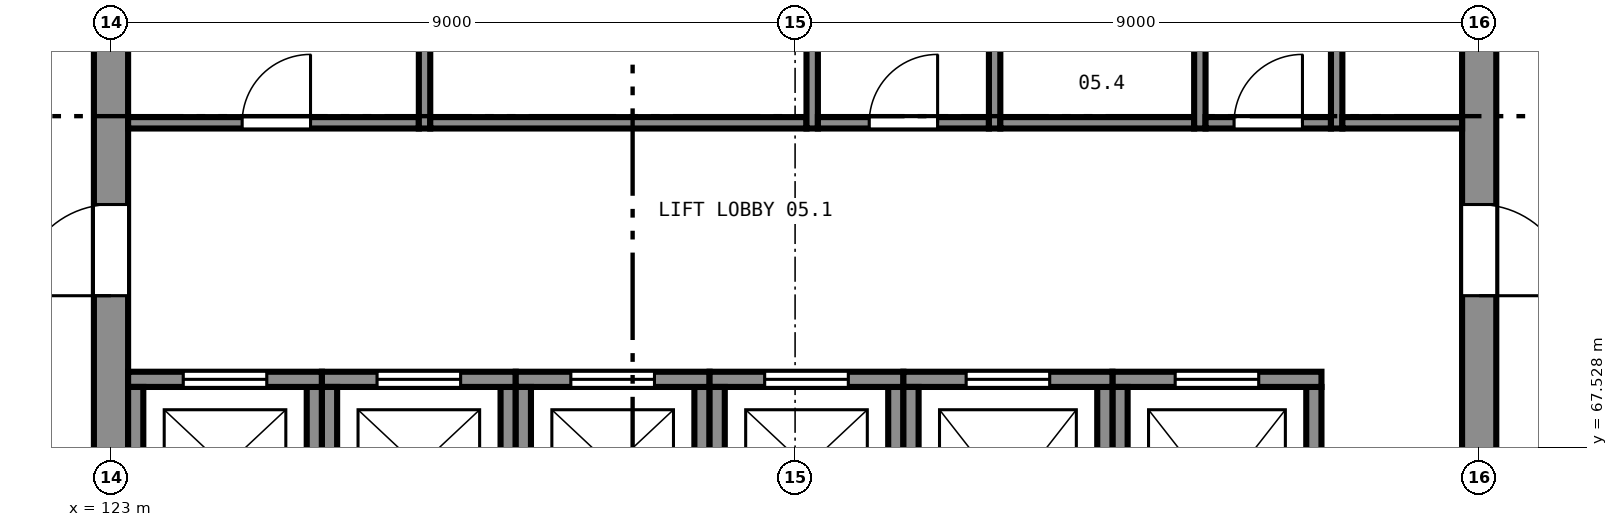
"""IFC4 building model, lengths in metres.
Left out: names, types, materials, properties, quantities, classifications, styles, units other than length and angle.
Written with IfcOpenShell. Run it as: python <this file> out.ifc"""

import sys

from ifc_helpers import new_model, si_unit, direction, frame, frame_2d, origin, place, context, subcontext, project, spatial, rectangle, extrude, element, fill, save


model = new_model("IFC4")
c1 = context("Model", 3, precision=1e-05, world=origin(), true_north=direction((0.0, 1.0)))
c2 = subcontext(c1, "Body", "Model", "MODEL_VIEW")
j1 = project(units=[si_unit("LENGTHUNIT", "METRE"), si_unit("PLANEANGLEUNIT", "RADIAN")], contexts=[c1])
p1 = place(None, origin())
s1 = spatial("IfcSite", under=j1, at=p1, CompositionType="ELEMENT")
p2 = place(p1, origin())
s2 = spatial("IfcBuilding", under=s1, at=p2, CompositionType="ELEMENT")
p3 = place(p2, frame((0.0, 0.0, 21.5)))
s3 = spatial("IfcBuildingStorey", under=s2, at=p3, CompositionType="ELEMENT", Elevation=21.5)
p4 = place(p3, frame((141.0, 65.225, 0.0), z_axis=(0.0, 0.0, 1.0), x_axis=(0.0, 1.0, 0.0)))
e1 = element("IfcWall", 1, at=p4, inside=s3, PredefinedType="SHEAR", context=c2, shape_type="SweptSolid", body=[
    extrude(rectangle(XDim=17.55, YDim=0.45, at=frame_2d((8.775, 0.0))), origin(), (0.0, 0.0, 1.0), 4.0),
])
p5 = place(p4, frame((4.3, 0.0, 0.0)))
e2 = element("IfcOpeningElement", 2, at=p5, cuts=e1, PredefinedType="OPENING", context=c2, shape_type="SweptSolid", body=[
    extrude(rectangle(XDim=1.2, YDim=2.1, at=frame_2d((0.6, 1.05))), frame((0.0, 0.235, 0.0), z_axis=(0.0, -1.0, 0.0), x_axis=(1.0, 0.0, 0.0)), (0.0, 0.0, 1.0), 0.47),
])
p6 = place(p4, frame((12.05, 0.0, 0.0)))
e3 = element("IfcOpeningElement", 3, at=p6, cuts=e1, PredefinedType="OPENING", context=c2, shape_type="SweptSolid", body=[
    extrude(rectangle(XDim=1.2, YDim=2.1, at=frame_2d((0.6, 1.05))), frame((0.0, 0.235, 0.0), z_axis=(0.0, -1.0, 0.0), x_axis=(1.0, 0.0, 0.0)), (0.0, 0.0, 1.0), 0.47),
])
p7 = place(p3, frame((123.0, 82.775, 0.0), z_axis=(0.0, 0.0, 1.0), x_axis=(0.0, -1.0, 0.0)))
e4 = element("IfcWall", 4, at=p7, inside=s3, PredefinedType="SHEAR", context=c2, shape_type="SweptSolid", body=[
    extrude(rectangle(XDim=17.55, YDim=0.45, at=frame_2d((8.775, 0.0))), origin(), (0.0, 0.0, 1.0), 4.0),
])
p8 = place(p7, frame((12.05, 0.0, 0.0)))
e5 = element("IfcOpeningElement", 5, at=p8, cuts=e4, PredefinedType="OPENING", context=c2, shape_type="SweptSolid", body=[
    extrude(rectangle(XDim=1.2, YDim=2.1, at=frame_2d((0.6, 1.05))), frame((0.0, 0.235, 0.0), z_axis=(0.0, -1.0, 0.0), x_axis=(1.0, 0.0, 0.0)), (0.0, 0.0, 1.0), 0.47),
])
p9 = place(p7, frame((4.3, 0.0, 0.0)))
e6 = element("IfcOpeningElement", 6, at=p9, cuts=e4, PredefinedType="OPENING", context=c2, shape_type="SweptSolid", body=[
    extrude(rectangle(XDim=1.2, YDim=2.1, at=frame_2d((0.6, 1.05))), frame((0.0, 0.235, 0.0), z_axis=(0.0, -1.0, 0.0), x_axis=(1.0, 0.0, 0.0)), (0.0, 0.0, 1.0), 0.47),
])
p10 = place(p3, frame((125.675, 66.225, 0.0), z_axis=(0.0, 0.0, 1.0), x_axis=(0.0, 1.0, 0.0)))
e7 = element("IfcWall", 7, at=p10, inside=s3, PredefinedType="SHEAR", context=c2, shape_type="SweptSolid", body=[
    extrude(rectangle(XDim=2.1, YDim=0.2, at=frame_2d((1.05, 0.0))), origin(), (0.0, 0.0, 1.0), 4.0),
])
p11 = place(p3, frame((125.775, 68.425, 0.0), z_axis=(0.0, 0.0, 1.0), x_axis=(-1.0, 0.0, 0.0)))
e8 = element("IfcWall", 8, at=p11, inside=s3, PredefinedType="SHEAR", context=c2, shape_type="SweptSolid", body=[
    extrude(rectangle(XDim=2.55, YDim=0.2, at=frame_2d((1.275, 0.0))), origin(), (0.0, 0.0, 1.0), 4.0),
])
p12 = place(p11, frame((0.725, 0.0, 0.0)))
e9 = element("IfcOpeningElement", 9, at=p12, cuts=e8, PredefinedType="OPENING", context=c2, shape_type="SweptSolid", body=[
    extrude(rectangle(XDim=1.1, YDim=2.1, at=frame_2d((0.55, 1.05))), frame((0.0, 0.11, 0.0), z_axis=(0.0, -1.0, 0.0), x_axis=(1.0, 0.0, 0.0)), (0.0, 0.0, 1.0), 0.22),
])
for number, where, z_axis, x_axis in (
    (10, (123.325, 68.325, 0.0), (0.0, 0.0, 1.0), (0.0, -1.0, 0.0)),
    (11, (128.225, 66.225, 0.0), (0.0, 0.0, 1.0), (0.0, 1.0, 0.0)),
):
    element("IfcWall", number, at=place(p3, frame(where, z_axis=z_axis, x_axis=x_axis)), inside=s3, PredefinedType="SHEAR", context=c2, shape_type="SweptSolid", body=[
        extrude(rectangle(XDim=2.1, YDim=0.2, at=frame_2d((1.05, 0.0))), origin(), (0.0, 0.0, 1.0), 4.0),
    ])
p13 = place(p3, frame((128.325, 68.425, 0.0), z_axis=(0.0, 0.0, 1.0), x_axis=(-1.0, 0.0, 0.0)))
e12 = element("IfcWall", 12, at=p13, inside=s3, PredefinedType="SHEAR", context=c2, shape_type="SweptSolid", body=[
    extrude(rectangle(XDim=2.55, YDim=0.2, at=frame_2d((1.275, 0.0))), origin(), (0.0, 0.0, 1.0), 4.0),
])
p14 = place(p13, frame((0.725, 0.0, 0.0)))
e13 = element("IfcOpeningElement", 13, at=p14, cuts=e12, PredefinedType="OPENING", context=c2, shape_type="SweptSolid", body=[
    extrude(rectangle(XDim=1.1, YDim=2.1, at=frame_2d((0.55, 1.05))), frame((0.0, 0.11, 0.0), z_axis=(0.0, -1.0, 0.0), x_axis=(1.0, 0.0, 0.0)), (0.0, 0.0, 1.0), 0.22),
])
for number, where, z_axis, x_axis in (
    (14, (125.875, 68.325, 0.0), (0.0, 0.0, 1.0), (0.0, -1.0, 0.0)),
    (15, (130.775, 66.225, 0.0), (0.0, 0.0, 1.0), (0.0, 1.0, 0.0)),
):
    element("IfcWall", number, at=place(p3, frame(where, z_axis=z_axis, x_axis=x_axis)), inside=s3, PredefinedType="SHEAR", context=c2, shape_type="SweptSolid", body=[
        extrude(rectangle(XDim=2.1, YDim=0.2, at=frame_2d((1.05, 0.0))), origin(), (0.0, 0.0, 1.0), 4.0),
    ])
p15 = place(p3, frame((130.875, 68.425, 0.0), z_axis=(0.0, 0.0, 1.0), x_axis=(-1.0, 0.0, 0.0)))
e16 = element("IfcWall", 16, at=p15, inside=s3, PredefinedType="SHEAR", context=c2, shape_type="SweptSolid", body=[
    extrude(rectangle(XDim=2.55, YDim=0.2, at=frame_2d((1.275, 0.0))), origin(), (0.0, 0.0, 1.0), 4.0),
])
p16 = place(p15, frame((0.725, 0.0, 0.0)))
e17 = element("IfcOpeningElement", 17, at=p16, cuts=e16, PredefinedType="OPENING", context=c2, shape_type="SweptSolid", body=[
    extrude(rectangle(XDim=1.1, YDim=2.1, at=frame_2d((0.55, 1.05))), frame((0.0, 0.11, 0.0), z_axis=(0.0, -1.0, 0.0), x_axis=(1.0, 0.0, 0.0)), (0.0, 0.0, 1.0), 0.22),
])
for number, where, z_axis, x_axis in (
    (18, (128.425, 68.325, 0.0), (0.0, 0.0, 1.0), (0.0, -1.0, 0.0)),
    (19, (133.325, 66.225, 0.0), (0.0, 0.0, 1.0), (0.0, 1.0, 0.0)),
):
    element("IfcWall", number, at=place(p3, frame(where, z_axis=z_axis, x_axis=x_axis)), inside=s3, PredefinedType="SHEAR", context=c2, shape_type="SweptSolid", body=[
        extrude(rectangle(XDim=2.1, YDim=0.2, at=frame_2d((1.05, 0.0))), origin(), (0.0, 0.0, 1.0), 4.0),
    ])
p17 = place(p3, frame((133.425, 68.425, 0.0), z_axis=(0.0, 0.0, 1.0), x_axis=(-1.0, 0.0, 0.0)))
e20 = element("IfcWall", 20, at=p17, inside=s3, PredefinedType="SHEAR", context=c2, shape_type="SweptSolid", body=[
    extrude(rectangle(XDim=2.55, YDim=0.2, at=frame_2d((1.275, 0.0))), origin(), (0.0, 0.0, 1.0), 4.0),
])
p18 = place(p17, frame((0.725, 0.0, 0.0)))
e21 = element("IfcOpeningElement", 21, at=p18, cuts=e20, PredefinedType="OPENING", context=c2, shape_type="SweptSolid", body=[
    extrude(rectangle(XDim=1.1, YDim=2.1, at=frame_2d((0.55, 1.05))), frame((0.0, 0.11, 0.0), z_axis=(0.0, -1.0, 0.0), x_axis=(1.0, 0.0, 0.0)), (0.0, 0.0, 1.0), 0.22),
])
p19 = place(p3, frame((130.975, 68.325, 0.0), z_axis=(0.0, 0.0, 1.0), x_axis=(0.0, -1.0, 0.0)))
e22 = element("IfcWall", 22, at=p19, inside=s3, PredefinedType="SHEAR", context=c2, shape_type="SweptSolid", body=[
    extrude(rectangle(XDim=2.1, YDim=0.2, at=frame_2d((1.05, 0.0))), origin(), (0.0, 0.0, 1.0), 4.0),
])
p20 = place(p3, frame((136.075, 65.425, 0.0), z_axis=(0.0, 0.0, 1.0), x_axis=(0.0, 1.0, 0.0)))
e23 = element("IfcWall", 23, at=p20, inside=s3, PredefinedType="SHEAR", context=c2, shape_type="SweptSolid", body=[
    extrude(rectangle(XDim=2.9, YDim=0.2, at=frame_2d((1.45, 0.0))), origin(), (0.0, 0.0, 1.0), 4.0),
])
p21 = place(p3, frame((136.175, 68.425, 0.0), z_axis=(0.0, 0.0, 1.0), x_axis=(-1.0, 0.0, 0.0)))
e24 = element("IfcWall", 24, at=p21, inside=s3, PredefinedType="SHEAR", context=c2, shape_type="SweptSolid", body=[
    extrude(rectangle(XDim=2.75, YDim=0.2, at=frame_2d((1.375, 0.0))), origin(), (0.0, 0.0, 1.0), 4.0),
])
p22 = place(p21, frame((0.825, 0.0, 0.0)))
e25 = element("IfcOpeningElement", 25, at=p22, cuts=e24, PredefinedType="OPENING", context=c2, shape_type="SweptSolid", body=[
    extrude(rectangle(XDim=1.1, YDim=2.1, at=frame_2d((0.55, 1.05))), frame((0.0, 0.11, 0.0), z_axis=(0.0, -1.0, 0.0), x_axis=(1.0, 0.0, 0.0)), (0.0, 0.0, 1.0), 0.22),
])
for number, where, z_axis, x_axis in (
    (26, (133.525, 68.325, 0.0), (0.0, 0.0, 1.0), (0.0, -1.0, 0.0)),
    (27, (138.825, 65.425, 0.0), (0.0, 0.0, 1.0), (0.0, 1.0, 0.0)),
):
    element("IfcWall", number, at=place(p3, frame(where, z_axis=z_axis, x_axis=x_axis)), inside=s3, PredefinedType="SHEAR", context=c2, shape_type="SweptSolid", body=[
        extrude(rectangle(XDim=2.9, YDim=0.2, at=frame_2d((1.45, 0.0))), origin(), (0.0, 0.0, 1.0), 4.0),
    ])
p23 = place(p3, frame((138.925, 68.425, 0.0), z_axis=(0.0, 0.0, 1.0), x_axis=(-1.0, 0.0, 0.0)))
e28 = element("IfcWall", 28, at=p23, inside=s3, PredefinedType="SHEAR", context=c2, shape_type="SweptSolid", body=[
    extrude(rectangle(XDim=2.75, YDim=0.2, at=frame_2d((1.375, 0.0))), origin(), (0.0, 0.0, 1.0), 4.0),
])
p24 = place(p23, frame((0.825, 0.0, 0.0)))
e29 = element("IfcOpeningElement", 29, at=p24, cuts=e28, PredefinedType="OPENING", context=c2, shape_type="SweptSolid", body=[
    extrude(rectangle(XDim=1.1, YDim=2.1, at=frame_2d((0.55, 1.05))), frame((0.0, 0.11, 0.0), z_axis=(0.0, -1.0, 0.0), x_axis=(1.0, 0.0, 0.0)), (0.0, 0.0, 1.0), 0.22),
])
p25 = place(p3, frame((136.275, 68.325, 0.0), z_axis=(0.0, 0.0, 1.0), x_axis=(0.0, -1.0, 0.0)))
e30 = element("IfcWall", 30, at=p25, inside=s3, PredefinedType="SHEAR", context=c2, shape_type="SweptSolid", body=[
    extrude(rectangle(XDim=2.9, YDim=0.2, at=frame_2d((1.45, 0.0))), origin(), (0.0, 0.0, 1.0), 4.0),
])
p26 = place(p3, frame((127.125, 71.725, 0.0), z_axis=(0.0, 0.0, 1.0), x_axis=(0.0, 1.0, 0.0)))
e31 = element("IfcWall", 31, at=p26, inside=s3, PredefinedType="PARTITIONING", context=c2, shape_type="SweptSolid", body=[
    extrude(rectangle(XDim=4.55, YDim=0.15, at=frame_2d((2.275, 0.0))), origin(), (0.0, 0.0, 1.0), 3.75),
])
p27 = place(p3, frame((123.225, 71.8, 0.0), z_axis=(0.0, 0.0, 1.0), x_axis=(1.0, 0.0, 0.0)))
e32 = element("IfcWall", 32, at=p27, inside=s3, PredefinedType="PARTITIONING", context=c2, shape_type="SweptSolid", body=[
    extrude(rectangle(XDim=3.825, YDim=0.15, at=frame_2d((1.913, 0.0))), origin(), (0.0, 0.0, 1.0), 3.75),
])
p28 = place(p27, frame((1.5, 0.0, 0.0)))
e33 = element("IfcOpeningElement", 33, at=p28, cuts=e32, PredefinedType="OPENING", context=c2, shape_type="SweptSolid", body=[
    extrude(rectangle(XDim=0.9, YDim=2.1, at=frame_2d((0.45, 1.05))), frame((0.0, 0.085, 0.0), z_axis=(0.0, -1.0, 0.0), x_axis=(1.0, 0.0, 0.0)), (0.0, 0.0, 1.0), 0.17),
])
p29 = place(p3, frame((132.225, 71.725, 0.0), z_axis=(0.0, 0.0, 1.0), x_axis=(0.0, 1.0, 0.0)))
e34 = element("IfcWall", 34, at=p29, inside=s3, PredefinedType="PARTITIONING", context=c2, shape_type="SweptSolid", body=[
    extrude(rectangle(XDim=4.55, YDim=0.15, at=frame_2d((2.275, 0.0))), origin(), (0.0, 0.0, 1.0), 3.75),
])
p30 = place(p3, frame((127.2, 71.8, 0.0), z_axis=(0.0, 0.0, 1.0), x_axis=(1.0, 0.0, 0.0)))
e35 = element("IfcWall", 35, at=p30, inside=s3, PredefinedType="PARTITIONING", context=c2, shape_type="SweptSolid", body=[
    extrude(rectangle(XDim=4.95, YDim=0.15, at=frame_2d((2.475, 0.0))), origin(), (0.0, 0.0, 1.0), 3.75),
])
p31 = place(p3, frame((134.625, 71.725, 0.0), z_axis=(0.0, 0.0, 1.0), x_axis=(0.0, 1.0, 0.0)))
e36 = element("IfcWall", 36, at=p31, inside=s3, PredefinedType="PARTITIONING", context=c2, shape_type="SweptSolid", body=[
    extrude(rectangle(XDim=4.55, YDim=0.15, at=frame_2d((2.275, 0.0))), origin(), (0.0, 0.0, 1.0), 3.75),
])
p32 = place(p3, frame((132.3, 71.8, 0.0), z_axis=(0.0, 0.0, 1.0), x_axis=(1.0, 0.0, 0.0)))
e37 = element("IfcWall", 37, at=p32, inside=s3, PredefinedType="PARTITIONING", context=c2, shape_type="SweptSolid", body=[
    extrude(rectangle(XDim=2.25, YDim=0.15, at=frame_2d((1.125, 0.0))), origin(), (0.0, 0.0, 1.0), 3.75),
])
p33 = place(p32, frame((0.675, 0.0, 0.0)))
e38 = element("IfcOpeningElement", 38, at=p33, cuts=e37, PredefinedType="OPENING", context=c2, shape_type="SweptSolid", body=[
    extrude(rectangle(XDim=0.9, YDim=2.1, at=frame_2d((0.45, 1.05))), frame((0.0, 0.085, 0.0), z_axis=(0.0, -1.0, 0.0), x_axis=(1.0, 0.0, 0.0)), (0.0, 0.0, 1.0), 0.17),
])
p34 = place(p3, frame((137.325, 71.725, 0.0), z_axis=(0.0, 0.0, 1.0), x_axis=(0.0, 1.0, 0.0)))
e39 = element("IfcWall", 39, at=p34, inside=s3, PredefinedType="PARTITIONING", context=c2, shape_type="SweptSolid", body=[
    extrude(rectangle(XDim=4.55, YDim=0.15, at=frame_2d((2.275, 0.0))), origin(), (0.0, 0.0, 1.0), 3.75),
])
p35 = place(p3, frame((134.7, 71.8, 0.0), z_axis=(0.0, 0.0, 1.0), x_axis=(1.0, 0.0, 0.0)))
e40 = element("IfcWall", 40, at=p35, inside=s3, PredefinedType="PARTITIONING", context=c2, shape_type="SweptSolid", body=[
    extrude(rectangle(XDim=2.55, YDim=0.15, at=frame_2d((1.275, 0.0))), origin(), (0.0, 0.0, 1.0), 3.75),
])
p36 = place(p3, frame((139.125, 71.725, 0.0), z_axis=(0.0, 0.0, 1.0), x_axis=(0.0, 1.0, 0.0)))
e41 = element("IfcWall", 41, at=p36, inside=s3, PredefinedType="PARTITIONING", context=c2, shape_type="SweptSolid", body=[
    extrude(rectangle(XDim=4.55, YDim=0.15, at=frame_2d((2.275, 0.0))), origin(), (0.0, 0.0, 1.0), 3.75),
])
p37 = place(p3, frame((137.4, 71.8, 0.0), z_axis=(0.0, 0.0, 1.0), x_axis=(1.0, 0.0, 0.0)))
e42 = element("IfcWall", 42, at=p37, inside=s3, PredefinedType="PARTITIONING", context=c2, shape_type="SweptSolid", body=[
    extrude(rectangle(XDim=1.65, YDim=0.15, at=frame_2d((0.825, 0.0))), origin(), (0.0, 0.0, 1.0), 3.75),
])
p38 = place(p37, frame((0.375, 0.0, 0.0)))
e43 = element("IfcOpeningElement", 43, at=p38, cuts=e42, PredefinedType="OPENING", context=c2, shape_type="SweptSolid", body=[
    extrude(rectangle(XDim=0.9, YDim=2.1, at=frame_2d((0.45, 1.05))), frame((0.0, 0.085, 0.0), z_axis=(0.0, -1.0, 0.0), x_axis=(1.0, 0.0, 0.0)), (0.0, 0.0, 1.0), 0.17),
])
p39 = place(p3, frame((139.2, 71.8, 0.0), z_axis=(0.0, 0.0, 1.0), x_axis=(1.0, 0.0, 0.0)))
e44 = element("IfcWall", 44, at=p39, inside=s3, PredefinedType="PARTITIONING", context=c2, shape_type="SweptSolid", body=[
    extrude(rectangle(XDim=1.575, YDim=0.15, at=frame_2d((0.788, 0.0))), origin(), (0.0, 0.0, 1.0), 3.75),
])
p40 = place(p12, origin())
e45 = element("IfcDoor", 45, at=p40, inside=s3, OperationType="SLIDING_TO_LEFT", PredefinedType="DOOR", context=c2, shape_type="SweptSolid", body=[
    extrude(rectangle(XDim=1.1, YDim=2.1, at=frame_2d((0.55, 1.05))), frame((0.0, 0.025, 0.0), z_axis=(0.0, -1.0, 0.0), x_axis=(1.0, 0.0, 0.0)), (0.0, 0.0, 1.0), 0.05),
])
fill(e9, e45)
p41 = place(p14, origin())
e46 = element("IfcDoor", 46, at=p41, inside=s3, OperationType="SLIDING_TO_LEFT", PredefinedType="DOOR", context=c2, shape_type="SweptSolid", body=[
    extrude(rectangle(XDim=1.1, YDim=2.1, at=frame_2d((0.55, 1.05))), frame((0.0, 0.025, 0.0), z_axis=(0.0, -1.0, 0.0), x_axis=(1.0, 0.0, 0.0)), (0.0, 0.0, 1.0), 0.05),
])
fill(e13, e46)
p42 = place(p16, origin())
e47 = element("IfcDoor", 47, at=p42, inside=s3, OperationType="SLIDING_TO_LEFT", PredefinedType="DOOR", context=c2, shape_type="SweptSolid", body=[
    extrude(rectangle(XDim=1.1, YDim=2.1, at=frame_2d((0.55, 1.05))), frame((0.0, 0.025, 0.0), z_axis=(0.0, -1.0, 0.0), x_axis=(1.0, 0.0, 0.0)), (0.0, 0.0, 1.0), 0.05),
])
fill(e17, e47)
p43 = place(p18, origin())
e48 = element("IfcDoor", 48, at=p43, inside=s3, OperationType="SLIDING_TO_LEFT", PredefinedType="DOOR", context=c2, shape_type="SweptSolid", body=[
    extrude(rectangle(XDim=1.1, YDim=2.1, at=frame_2d((0.55, 1.05))), frame((0.0, 0.025, 0.0), z_axis=(0.0, -1.0, 0.0), x_axis=(1.0, 0.0, 0.0)), (0.0, 0.0, 1.0), 0.05),
])
fill(e21, e48)
p44 = place(p22, origin())
e49 = element("IfcDoor", 49, at=p44, inside=s3, OperationType="SLIDING_TO_LEFT", PredefinedType="DOOR", context=c2, shape_type="SweptSolid", body=[
    extrude(rectangle(XDim=1.1, YDim=2.1, at=frame_2d((0.55, 1.05))), frame((0.0, 0.025, 0.0), z_axis=(0.0, -1.0, 0.0), x_axis=(1.0, 0.0, 0.0)), (0.0, 0.0, 1.0), 0.05),
])
fill(e25, e49)
p45 = place(p24, origin())
e50 = element("IfcDoor", 50, at=p45, inside=s3, OperationType="SLIDING_TO_LEFT", PredefinedType="DOOR", context=c2, shape_type="SweptSolid", body=[
    extrude(rectangle(XDim=1.1, YDim=2.1, at=frame_2d((0.55, 1.05))), frame((0.0, 0.025, 0.0), z_axis=(0.0, -1.0, 0.0), x_axis=(1.0, 0.0, 0.0)), (0.0, 0.0, 1.0), 0.05),
])
fill(e29, e50)
p46 = place(p8, frame((1.2, 0.0, 0.0), z_axis=(0.0, 0.0, 1.0), x_axis=(-1.0, 0.0, 0.0)))
e51 = element("IfcDoor", 51, at=p46, inside=s3, OperationType="SINGLE_SWING_RIGHT", PredefinedType="DOOR", context=c2, shape_type="SweptSolid", body=[
    extrude(rectangle(XDim=1.2, YDim=2.1, at=frame_2d((0.6, 1.05))), frame((0.0, 0.025, 0.0), z_axis=(0.0, -1.0, 0.0), x_axis=(1.0, 0.0, 0.0)), (0.0, 0.0, 1.0), 0.05),
])
fill(e5, e51)
p47 = place(p5, frame((1.2, 0.0, 0.0), z_axis=(0.0, 0.0, 1.0), x_axis=(-1.0, 0.0, 0.0)))
e52 = element("IfcDoor", 52, at=p47, inside=s3, OperationType="SINGLE_SWING_LEFT", PredefinedType="DOOR", context=c2, shape_type="SweptSolid", body=[
    extrude(rectangle(XDim=1.2, YDim=2.1, at=frame_2d((0.6, 1.05))), frame((0.0, 0.025, 0.0), z_axis=(0.0, -1.0, 0.0), x_axis=(1.0, 0.0, 0.0)), (0.0, 0.0, 1.0), 0.05),
])
fill(e2, e52)
p48 = place(p28, origin())
e53 = element("IfcDoor", 53, at=p48, inside=s3, OperationType="SINGLE_SWING_LEFT", PredefinedType="DOOR", context=c2, shape_type="SweptSolid", body=[
    extrude(rectangle(XDim=0.9, YDim=2.1, at=frame_2d((0.45, 1.05))), frame((0.0, 0.025, 0.0), z_axis=(0.0, -1.0, 0.0), x_axis=(1.0, 0.0, 0.0)), (0.0, 0.0, 1.0), 0.05),
])
fill(e33, e53)
p49 = place(p33, origin())
e54 = element("IfcDoor", 54, at=p49, inside=s3, OperationType="SINGLE_SWING_LEFT", PredefinedType="DOOR", context=c2, shape_type="SweptSolid", body=[
    extrude(rectangle(XDim=0.9, YDim=2.1, at=frame_2d((0.45, 1.05))), frame((0.0, 0.025, 0.0), z_axis=(0.0, -1.0, 0.0), x_axis=(1.0, 0.0, 0.0)), (0.0, 0.0, 1.0), 0.05),
])
fill(e38, e54)
p50 = place(p38, origin())
e55 = element("IfcDoor", 55, at=p50, inside=s3, OperationType="SINGLE_SWING_LEFT", PredefinedType="DOOR", context=c2, shape_type="SweptSolid", body=[
    extrude(rectangle(XDim=0.9, YDim=2.1, at=frame_2d((0.45, 1.05))), frame((0.0, 0.025, 0.0), z_axis=(0.0, -1.0, 0.0), x_axis=(1.0, 0.0, 0.0)), (0.0, 0.0, 1.0), 0.05),
])
fill(e43, e55)
save(model, sys.argv[1])
